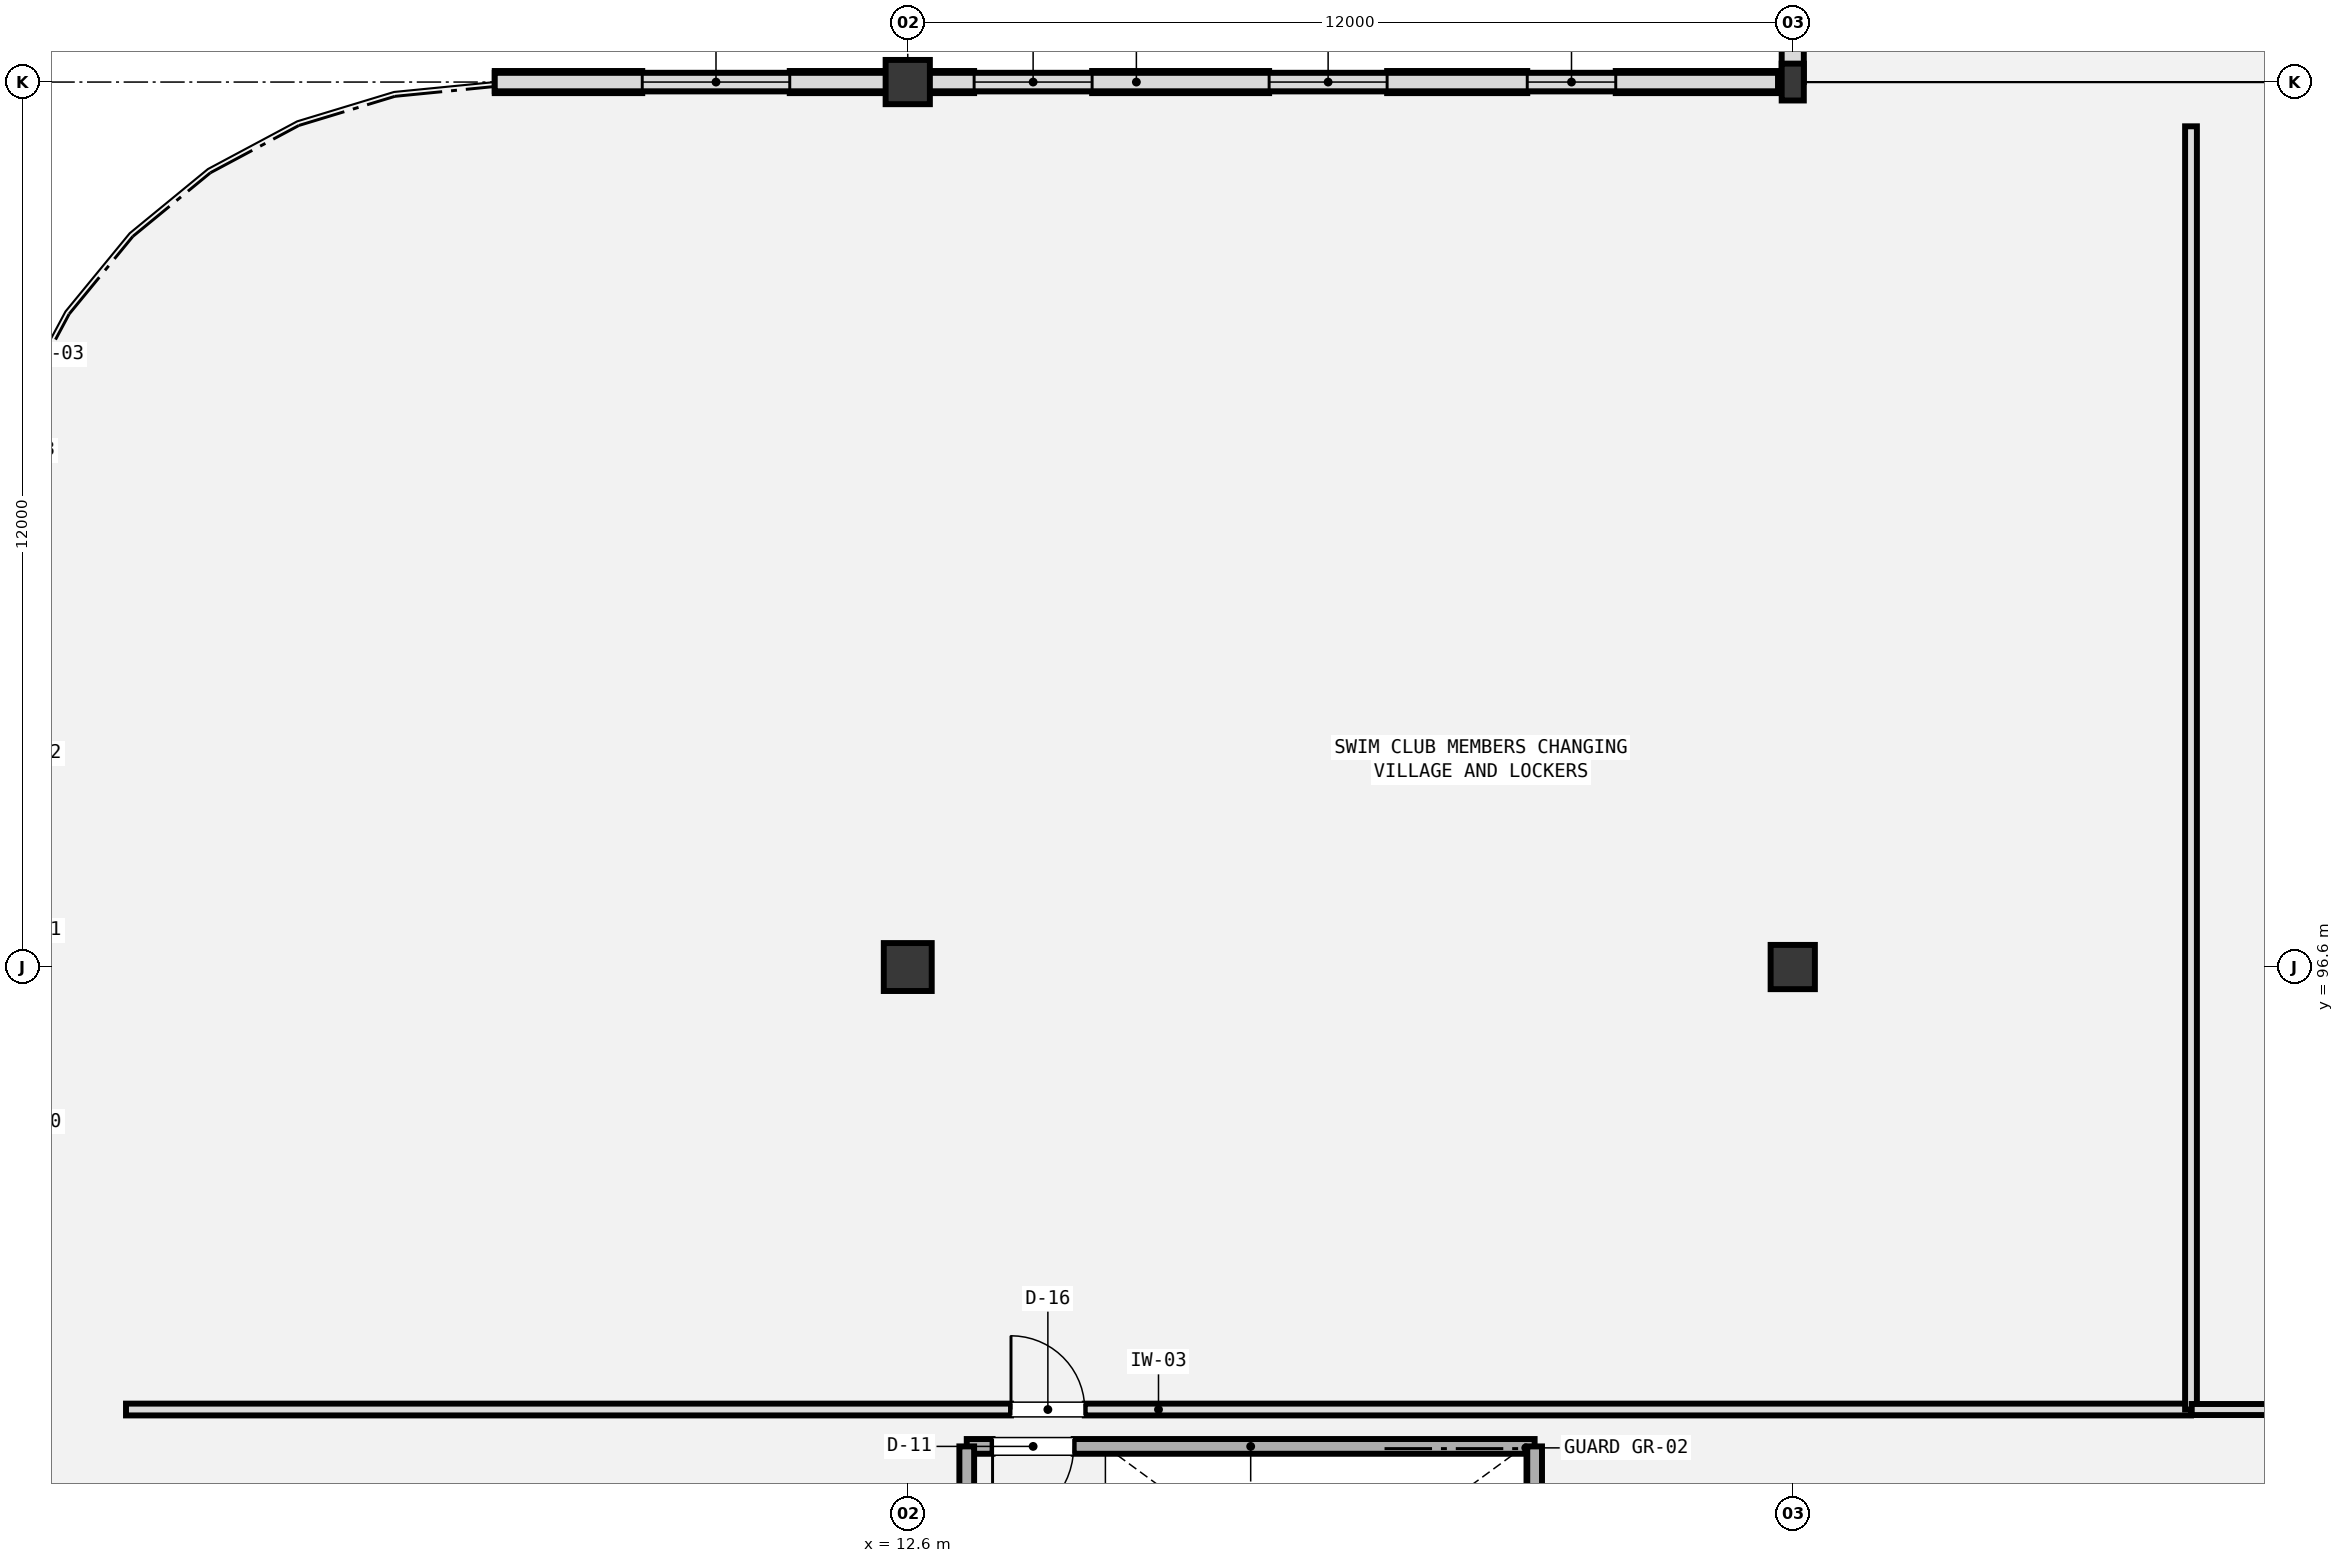
"""IFC4 building model, lengths in metres.
Left out: names, types, materials, properties, quantities, classifications, styles, units other than length and angle.
Written with IfcOpenShell. Run it as: python <this file> out.ifc"""

import sys

from ifc_helpers import new_model, si_unit, direction, frame, frame_2d, origin, origin_2d, place, context, subcontext, project, spatial, rectangle, i_section, extrude, element, fill, save


model = new_model("IFC4")
c1 = context("Model", 3, precision=1e-05, world=origin(), true_north=direction((0.0, 1.0)))
c2 = subcontext(c1, "Body", "Model", "MODEL_VIEW")
j1 = project(units=[si_unit("LENGTHUNIT", "METRE"), si_unit("PLANEANGLEUNIT", "RADIAN")], contexts=[c1])
p1 = place(None, origin())
s1 = spatial("IfcSite", under=j1, at=p1, CompositionType="ELEMENT")
p2 = place(p1, origin())
s2 = spatial("IfcBuilding", under=s1, at=p2, CompositionType="ELEMENT")
p3 = place(p2, frame((0.0, 0.0, 5.4)))
s3 = spatial("IfcBuildingStorey", under=s2, at=p3, CompositionType="ELEMENT", Elevation=5.4)
p4 = place(p3, frame((12.6, 96.6, 0.0), z_axis=(0.0, 0.0, 1.0), x_axis=(1.0, 0.0, 0.0)))
e1 = element("IfcColumn", 1, at=p4, inside=s3, PredefinedType="COLUMN", context=c2, shape_type="SweptSolid", body=[
    extrude(rectangle(XDim=0.65, YDim=0.65, at=origin_2d()), origin(), (0.0, 0.0, 1.0), 4.56),
])
p5 = place(p3, frame((12.6, 108.6, 0.0), z_axis=(0.0, 0.0, 1.0), x_axis=(1.0, 0.0, 0.0)))
e2 = element("IfcColumn", 2, at=p5, inside=s3, PredefinedType="COLUMN", context=c2, shape_type="SweptSolid", body=[
    extrude(rectangle(XDim=0.6, YDim=0.6, at=origin_2d()), origin(), (0.0, 0.0, 1.0), 4.2),
])
p6 = place(p3, frame((24.6, 96.6, 0.0), z_axis=(0.0, 0.0, 1.0), x_axis=(1.0, 0.0, 0.0)))
e3 = element("IfcColumn", 3, at=p6, inside=s3, PredefinedType="COLUMN", context=c2, shape_type="SweptSolid", body=[
    extrude(rectangle(XDim=0.6, YDim=0.6, at=origin_2d()), origin(), (0.0, 0.0, 1.0), 4.56),
])
p7 = place(p3, frame((24.6, 108.6, 0.0), z_axis=(0.0, 0.0, 1.0), x_axis=(1.0, 0.0, 0.0)))
e4 = element("IfcColumn", 4, at=p7, inside=s3, PredefinedType="COLUMN", context=c2, shape_type="SweptSolid", body=[
    extrude(i_section(OverallWidth=0.3, OverallDepth=0.5, WebThickness=0.014, FlangeThickness=0.028, FilletRadius=0.027, at=origin_2d()), origin(), (0.0, 0.0, 1.0), 4.2),
])
p8 = place(p3, frame((7.0, 108.6, 0.0), z_axis=(0.0, 0.0, 1.0), x_axis=(1.0, 0.0, 0.0)))
e5 = element("IfcWall", 5, at=p8, inside=s3, PredefinedType="SOLIDWALL", context=c2, shape_type="SweptSolid", body=[
    extrude(rectangle(XDim=17.6, YDim=0.3, at=frame_2d((8.8, 0.0))), origin(), (0.0, 0.0, 1.0), 4.5),
])
p9 = place(p8, frame((2.0, 0.0, 1.2)))
e6 = element("IfcOpeningElement", 6, at=p9, cuts=e5, PredefinedType="OPENING", context=c2, shape_type="SweptSolid", body=[
    extrude(rectangle(XDim=2.0, YDim=1.2, at=frame_2d((1.0, 0.6))), frame((0.0, 0.16, 0.0), z_axis=(0.0, -1.0, 0.0), x_axis=(1.0, 0.0, 0.0)), (0.0, 0.0, 1.0), 0.32),
])
p10 = place(p8, frame((6.5, 0.0, 1.2)))
e7 = element("IfcOpeningElement", 7, at=p10, cuts=e5, PredefinedType="OPENING", context=c2, shape_type="SweptSolid", body=[
    extrude(rectangle(XDim=1.6, YDim=1.2, at=frame_2d((0.8, 0.6))), frame((0.0, 0.16, 0.0), z_axis=(0.0, -1.0, 0.0), x_axis=(1.0, 0.0, 0.0)), (0.0, 0.0, 1.0), 0.32),
])
p11 = place(p8, frame((10.5, 0.0, 1.2)))
e8 = element("IfcOpeningElement", 8, at=p11, cuts=e5, PredefinedType="OPENING", context=c2, shape_type="SweptSolid", body=[
    extrude(rectangle(XDim=1.6, YDim=1.5, at=frame_2d((0.8, 0.75))), frame((0.0, 0.16, 0.0), z_axis=(0.0, -1.0, 0.0), x_axis=(1.0, 0.0, 0.0)), (0.0, 0.0, 1.0), 0.32),
])
p12 = place(p8, frame((14.0, 0.0, 1.2)))
e9 = element("IfcOpeningElement", 9, at=p12, cuts=e5, PredefinedType="OPENING", context=c2, shape_type="SweptSolid", body=[
    extrude(rectangle(XDim=1.2, YDim=1.5, at=frame_2d((0.6, 0.75))), frame((0.0, 0.16, 0.0), z_axis=(0.0, -1.0, 0.0), x_axis=(1.0, 0.0, 0.0)), (0.0, 0.0, 1.0), 0.32),
])
p13 = place(p3, frame((24.6, 108.6, 0.0), z_axis=(0.0, 0.0, 1.0), x_axis=(0.0, 1.0, 0.0)))
e10 = element("IfcWall", 10, at=p13, inside=s3, PredefinedType="SOLIDWALL", context=c2, shape_type="SweptSolid", body=[
    extrude(rectangle(XDim=27.4, YDim=0.3, at=frame_2d((13.7, 0.0))), origin(), (0.0, 0.0, 1.0), 3.08),
])
p14 = place(p13, frame((3.1, 0.0, 0.85)))
e11 = element("IfcOpeningElement", 11, at=p14, cuts=e10, PredefinedType="OPENING", context=c2, shape_type="SweptSolid", body=[
    extrude(rectangle(XDim=3.2, YDim=1.5, at=frame_2d((1.6, 0.75))), frame((0.0, 0.16, 0.0), z_axis=(0.0, -1.0, 0.0), x_axis=(1.0, 0.0, 0.0)), (0.0, 0.0, 1.0), 0.32),
])
p15 = place(p13, frame((14.8, 0.0, 0.85)))
e12 = element("IfcOpeningElement", 12, at=p15, cuts=e10, PredefinedType="OPENING", context=c2, shape_type="SweptSolid", body=[
    extrude(rectangle(XDim=3.6, YDim=1.5, at=frame_2d((1.8, 0.75))), frame((0.0, 0.16, 0.0), z_axis=(0.0, -1.0, 0.0), x_axis=(1.0, 0.0, 0.0)), (0.0, 0.0, 1.0), 0.32),
])
p16 = place(p13, frame((20.6, 0.0, 0.85)))
e13 = element("IfcOpeningElement", 13, at=p16, cuts=e10, PredefinedType="OPENING", context=c2, shape_type="SweptSolid", body=[
    extrude(rectangle(XDim=3.6, YDim=1.5, at=frame_2d((1.8, 0.75))), frame((0.0, 0.16, 0.0), z_axis=(0.0, -1.0, 0.0), x_axis=(1.0, 0.0, 0.0)), (0.0, 0.0, 1.0), 0.32),
])
p17 = place(p3, frame((7.0, 108.6, 4.88), z_axis=(0.0, 0.0, 1.0), x_axis=(1.0, 0.0, 0.0)))
e14 = element("IfcWall", 14, at=p17, inside=s3, PredefinedType="PARAPET", context=c2, shape_type="SweptSolid", body=[
    extrude(rectangle(XDim=17.4, YDim=0.25, at=frame_2d((8.7, 0.0))), origin(), (0.0, 0.0, 1.0), 1.15),
])
p18 = place(p3, frame((13.4, 90.1, 0.0), z_axis=(0.0, 0.0, 1.0), x_axis=(1.0, 0.0, 0.0)))
e15 = element("IfcWall", 15, at=p18, inside=s3, PredefinedType="SHEAR", context=c2, shape_type="SweptSolid", body=[
    extrude(rectangle(XDim=7.7, YDim=0.2, at=frame_2d((3.85, 0.0))), origin(), (0.0, 0.0, 1.0), 4.56),
])
p19 = place(p18, frame((0.35, 0.0, 0.0)))
e16 = element("IfcOpeningElement", 16, at=p19, cuts=e15, PredefinedType="OPENING", context=c2, shape_type="SweptSolid", body=[
    extrude(rectangle(XDim=1.1, YDim=2.2, at=frame_2d((0.55, 1.1))), frame((0.0, 0.11, 0.0), z_axis=(0.0, -1.0, 0.0), x_axis=(1.0, 0.0, 0.0)), (0.0, 0.0, 1.0), 0.22),
])
for number, where, z_axis, x_axis in (
    (17, (13.4, 85.94, 0.0), (0.0, 0.0, 1.0), (0.0, 1.0, 0.0)),
    (18, (21.1, 85.94, 0.0), (0.0, 0.0, 1.0), (0.0, 1.0, 0.0)),
):
    element("IfcWall", number, at=place(p3, frame(where, z_axis=z_axis, x_axis=x_axis)), inside=s3, PredefinedType="SHEAR", context=c2, shape_type="SweptSolid", body=[
        extrude(rectangle(XDim=4.16, YDim=0.2, at=frame_2d((2.08, 0.0))), origin(), (0.0, 0.0, 1.0), 4.56),
    ])
p20 = place(p3, frame((2.0, 90.6, 0.0), z_axis=(0.0, 0.0, 1.0), x_axis=(1.0, 0.0, 0.0)))
e19 = element("IfcWall", 19, at=p20, inside=s3, PredefinedType="PLUMBINGWALL", context=c2, shape_type="SweptSolid", body=[
    extrude(rectangle(XDim=28.0, YDim=0.16, at=frame_2d((14.0, 0.0))), origin(), (0.0, 0.0, 1.0), 2.85),
])
p21 = place(p20, frame((12.0, 0.0, 0.0)))
e20 = element("IfcOpeningElement", 20, at=p21, cuts=e19, PredefinedType="OPENING", context=c2, shape_type="SweptSolid", body=[
    extrude(rectangle(XDim=1.0, YDim=2.2, at=frame_2d((0.5, 1.1))), frame((0.0, 0.09, 0.0), z_axis=(0.0, -1.0, 0.0), x_axis=(1.0, 0.0, 0.0)), (0.0, 0.0, 1.0), 0.18),
])
p22 = place(p3, frame((30.0, 90.6, 0.0), z_axis=(0.0, 0.0, 1.0), x_axis=(0.0, 1.0, 0.0)))
e21 = element("IfcWall", 21, at=p22, inside=s3, PredefinedType="PLUMBINGWALL", context=c2, shape_type="SweptSolid", body=[
    extrude(rectangle(XDim=17.4, YDim=0.16, at=frame_2d((8.7, 0.0))), origin(), (0.0, 0.0, 1.0), 2.85),
])
p23 = place(p3, frame((30.01, 90.6, 0.0), z_axis=(0.0, 0.0, 1.0), x_axis=(1.0, 0.0, 0.0)))
e22 = element("IfcWall", 22, at=p23, inside=s3, PredefinedType="PARTITIONING", context=c2, shape_type="SweptSolid", body=[
    extrude(rectangle(XDim=30.465, YDim=0.15, at=frame_2d((15.232, 0.0))), origin(), (0.0, 0.0, 1.0), 2.85),
])
p24 = place(p23, frame((9.99, 0.0, 0.0)))
e23 = element("IfcOpeningElement", 23, at=p24, cuts=e22, PredefinedType="OPENING", context=c2, shape_type="SweptSolid", body=[
    extrude(rectangle(XDim=1.6, YDim=2.2, at=frame_2d((0.8, 1.1))), frame((0.0, 0.085, 0.0), z_axis=(0.0, -1.0, 0.0), x_axis=(1.0, 0.0, 0.0)), (0.0, 0.0, 1.0), 0.17),
])
p25 = place(p9, origin())
e24 = element("IfcWindow", 24, at=p25, inside=s3, PartitioningType="DOUBLE_PANEL_VERTICAL", PredefinedType="WINDOW", context=c2, shape_type="SweptSolid", body=[
    extrude(rectangle(XDim=2.0, YDim=1.2, at=frame_2d((1.0, 0.6))), frame((0.0, 0.03, 0.0), z_axis=(0.0, -1.0, 0.0), x_axis=(1.0, 0.0, 0.0)), (0.0, 0.0, 1.0), 0.06),
])
fill(e6, e24)
p26 = place(p10, origin())
e25 = element("IfcWindow", 25, at=p26, inside=s3, PartitioningType="SINGLE_PANEL", PredefinedType="WINDOW", context=c2, shape_type="SweptSolid", body=[
    extrude(rectangle(XDim=1.6, YDim=1.2, at=frame_2d((0.8, 0.6))), frame((0.0, 0.03, 0.0), z_axis=(0.0, -1.0, 0.0), x_axis=(1.0, 0.0, 0.0)), (0.0, 0.0, 1.0), 0.06),
])
fill(e7, e25)
p27 = place(p11, origin())
e26 = element("IfcWindow", 26, at=p27, inside=s3, PartitioningType="SINGLE_PANEL", PredefinedType="WINDOW", context=c2, shape_type="SweptSolid", body=[
    extrude(rectangle(XDim=1.6, YDim=1.5, at=frame_2d((0.8, 0.75))), frame((0.0, 0.03, 0.0), z_axis=(0.0, -1.0, 0.0), x_axis=(1.0, 0.0, 0.0)), (0.0, 0.0, 1.0), 0.06),
])
fill(e8, e26)
p28 = place(p12, origin())
e27 = element("IfcWindow", 27, at=p28, inside=s3, PartitioningType="SINGLE_PANEL", PredefinedType="WINDOW", context=c2, shape_type="SweptSolid", body=[
    extrude(rectangle(XDim=1.2, YDim=1.5, at=frame_2d((0.6, 0.75))), frame((0.0, 0.03, 0.0), z_axis=(0.0, -1.0, 0.0), x_axis=(1.0, 0.0, 0.0)), (0.0, 0.0, 1.0), 0.06),
])
fill(e9, e27)
p29 = place(p19, frame((1.1, 0.0, 0.0), z_axis=(0.0, 0.0, 1.0), x_axis=(-1.0, 0.0, 0.0)))
e28 = element("IfcDoor", 28, at=p29, inside=s3, OperationType="SINGLE_SWING_RIGHT", PredefinedType="DOOR", context=c2, shape_type="SweptSolid", body=[
    extrude(rectangle(XDim=1.1, YDim=2.2, at=frame_2d((0.55, 1.1))), frame((0.0, 0.025, 0.0), z_axis=(0.0, -1.0, 0.0), x_axis=(1.0, 0.0, 0.0)), (0.0, 0.0, 1.0), 0.05),
])
fill(e16, e28)
p30 = place(p21, origin())
e29 = element("IfcDoor", 29, at=p30, inside=s3, OperationType="SINGLE_SWING_LEFT", PredefinedType="DOOR", context=c2, shape_type="SweptSolid", body=[
    extrude(rectangle(XDim=1.0, YDim=2.2, at=frame_2d((0.5, 1.1))), frame((0.0, 0.025, 0.0), z_axis=(0.0, -1.0, 0.0), x_axis=(1.0, 0.0, 0.0)), (0.0, 0.0, 1.0), 0.05),
])
fill(e20, e29)
save(model, sys.argv[1])
